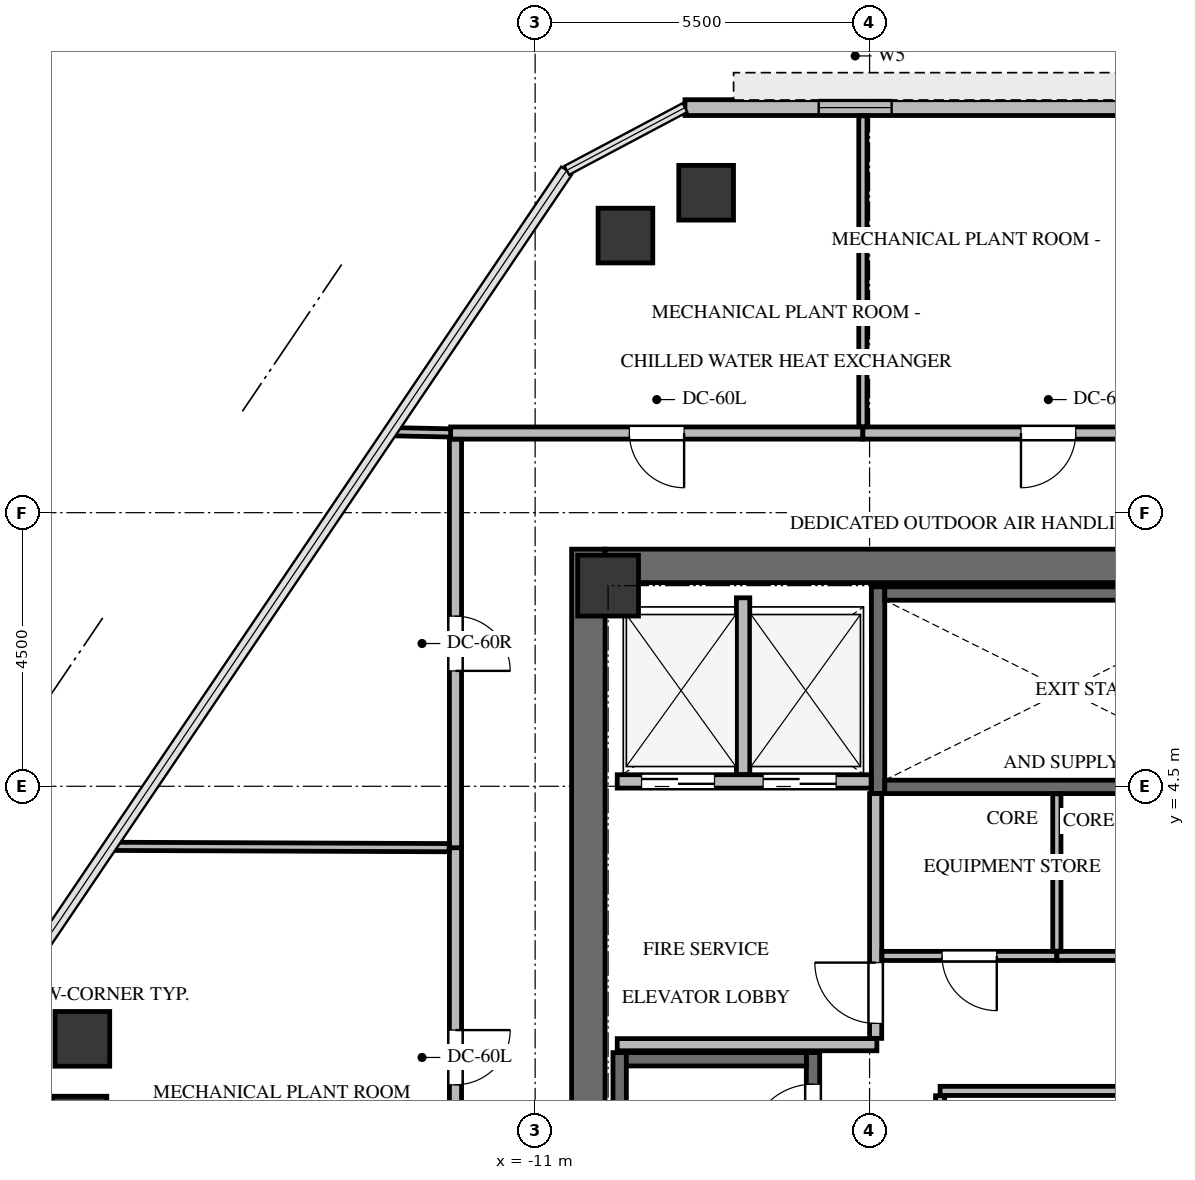
"""IFC4 building model, lengths in metres.
Left out: names, types, materials, properties, quantities, classifications, styles, units other than length and angle.
Written with IfcOpenShell. Run it as: python <this file> out.ifc"""

import sys

from ifc_helpers import new_model, si_unit, direction, frame, frame_2d, origin, origin_2d, place, context, subcontext, project, spatial, rectangle, extrude, source, transform, mapped, element, fill, save


model = new_model("IFC4")
c1 = context("Model", 3, precision=1e-05, world=origin(), true_north=direction((0.0, 1.0)))
c2 = subcontext(c1, "Body", "Model", "MODEL_VIEW")
j1 = project(units=[si_unit("LENGTHUNIT", "METRE"), si_unit("PLANEANGLEUNIT", "RADIAN")], contexts=[c1])
p1 = place(None, origin())
s1 = spatial("IfcSite", under=j1, at=p1, CompositionType="ELEMENT")
p2 = place(p1, origin())
s2 = spatial("IfcBuilding", under=s1, at=p2, CompositionType="ELEMENT")
p3 = place(p2, frame((0.0, 0.0, 268.3)))
s3 = spatial("IfcBuildingStorey", under=s2, at=p3, CompositionType="ELEMENT", Elevation=268.3)
p4 = place(p3, frame((-10.125, -8.4, 0.0), z_axis=(0.0, 0.0, 1.0), x_axis=(0.0, 1.0, 0.0)))
e1 = element("IfcWall", 1, at=p4, inside=s3, PredefinedType="SHEAR", context=c2, shape_type="SweptSolid", body=[
    extrude(rectangle(XDim=16.8, YDim=0.55, at=frame_2d((8.4, 0.0))), origin(), (0.0, 0.0, 1.0), 4.2),
])
p5 = place(p3, frame((-9.85, 8.125, 0.0), z_axis=(0.0, 0.0, 1.0), x_axis=(1.0, 0.0, 0.0)))
e2 = element("IfcWall", 2, at=p5, inside=s3, PredefinedType="SHEAR", context=c2, shape_type="SweptSolid", body=[
    extrude(rectangle(XDim=19.7, YDim=0.55, at=frame_2d((9.85, 0.0))), origin(), (0.0, 0.0, 1.0), 4.2),
])
p6 = place(p3, frame((-6.43, -7.77, -0.3), z_axis=(0.0, 0.0, 1.0), x_axis=(0.0, 1.0, 0.0)))
e3 = element("IfcWall", 3, at=p6, inside=s3, PredefinedType="SHEAR", context=c2, shape_type="SweptSolid", body=[
    extrude(rectangle(XDim=7.89, YDim=0.22, at=frame_2d((3.945, 0.0))), origin(), (0.0, 0.0, 1.0), 4.05),
])
p7 = place(p6, frame((6.32, 0.0, 0.0)))
e4 = element("IfcOpeningElement", 4, at=p7, cuts=e3, PredefinedType="OPENING", context=c2, shape_type="SweptSolid", body=[
    extrude(rectangle(XDim=1.05, YDim=2.15, at=frame_2d((0.525, 1.075))), frame((0.0, 0.12, 0.0), z_axis=(0.0, -1.0, 0.0), x_axis=(1.0, 0.0, 0.0)), (0.0, 0.0, 1.0), 0.24),
])
p8 = place(p3, frame((-9.61, 0.12, -0.3), z_axis=(0.0, 0.0, 1.0), x_axis=(0.0, -1.0, 0.0)))
e5 = element("IfcWall", 5, at=p8, inside=s3, PredefinedType="SHEAR", context=c2, shape_type="SweptSolid", body=[
    extrude(rectangle(XDim=7.89, YDim=0.22, at=frame_2d((3.945, 0.0))), origin(), (0.0, 0.0, 1.0), 4.05),
])
p9 = place(p3, frame((-6.54, 0.01, -0.3), z_axis=(0.0, 0.0, 1.0), x_axis=(-1.0, 0.0, 0.0)))
e6 = element("IfcWall", 6, at=p9, inside=s3, PredefinedType="SHEAR", context=c2, shape_type="SweptSolid", body=[
    extrude(rectangle(XDim=2.96, YDim=0.22, at=frame_2d((1.48, 0.0))), origin(), (0.0, 0.0, 1.0), 4.05),
])
p10 = place(p3, frame((-5.36, 7.78, -0.3), z_axis=(0.0, 0.0, 1.0), x_axis=(0.0, -1.0, 0.0)))
e7 = element("IfcWall", 7, at=p10, inside=s3, PredefinedType="SHEAR", context=c2, shape_type="SweptSolid", body=[
    extrude(rectangle(XDim=3.4, YDim=0.22, at=frame_2d((1.7, 0.0))), origin(), (0.0, 0.0, 1.0), 4.05),
])
p11 = place(p3, frame((-5.25, 4.49, -0.3), z_axis=(0.0, 0.0, 1.0), x_axis=(1.0, 0.0, 0.0)))
e8 = element("IfcWall", 8, at=p11, inside=s3, PredefinedType="SHEAR", context=c2, shape_type="SweptSolid", body=[
    extrude(rectangle(XDim=7.35, YDim=0.22, at=frame_2d((3.675, 0.0))), origin(), (0.0, 0.0, 1.0), 4.05),
])
p12 = place(p11, frame((5.85, 0.0, 0.0)))
e9 = element("IfcOpeningElement", 9, at=p12, cuts=e8, PredefinedType="OPENING", context=c2, shape_type="SweptSolid", body=[
    extrude(rectangle(XDim=1.05, YDim=2.15, at=frame_2d((0.525, 1.075))), frame((0.0, 0.12, 0.0), z_axis=(0.0, -1.0, 0.0), x_axis=(1.0, 0.0, 0.0)), (0.0, 0.0, 1.0), 0.24),
])
p13 = place(p3, frame((2.1, 7.67, -0.3), z_axis=(0.0, 0.0, 1.0), x_axis=(-1.0, 0.0, 0.0)))
e10 = element("IfcWall", 10, at=p13, inside=s3, PredefinedType="SHEAR", context=c2, shape_type="SweptSolid", body=[
    extrude(rectangle(XDim=7.35, YDim=0.22, at=frame_2d((3.675, 0.0))), origin(), (0.0, 0.0, 1.0), 4.05),
])
m1 = source(origin(), c2, "Body", "SweptSolid", [
    extrude(rectangle(XDim=1.0, YDim=1.0, at=origin_2d()), origin(), (0.0, 0.0, 1.0), 4.05),
])
p14 = place(p3, frame((-9.8, 7.8, -0.3), z_axis=(0.0, 0.0, 1.0), x_axis=(1.0, 0.0, 0.0)))
e11 = element("IfcColumn", 11, at=p14, inside=s3, PredefinedType="COLUMN", context=c2, shape_type="MappedRepresentation", body=[
    mapped(m1, transform((0.0, 0.0, 0.0), x_axis=(1.0, 0.0, 0.0), y_axis=(0.0, 1.0, 0.0), z_axis=(0.0, 0.0, 1.0), scale=1.0)),
])
m2 = source(origin(), c2, "Body", "SweptSolid", [
    extrude(rectangle(XDim=0.9, YDim=0.9, at=origin_2d()), origin(), (0.0, 0.0, 1.0), 4.05),
])
for number, where, z_axis, x_axis in (
    (12, (-18.494, -1.048, -0.3), (0.0, 0.0, 1.0), (1.0, 0.0, 0.0)),
    (13, (-18.446, 0.346, -0.3), (0.0, 0.0, 1.0), (1.0, 0.0, 0.0)),
    (14, (-9.515, 13.557, -0.3), (0.0, 0.0, 1.0), (1.0, 0.0, 0.0)),
    (15, (-8.188, 14.262, -0.3), (0.0, 0.0, 1.0), (1.0, 0.0, 0.0)),
):
    element("IfcColumn", number, at=place(p3, frame(where, z_axis=z_axis, x_axis=x_axis)), inside=s3, PredefinedType="COLUMN", context=c2, shape_type="MappedRepresentation", body=[
        mapped(m2, transform((0.0, 0.0, 0.0), x_axis=(1.0, 0.0, 0.0), y_axis=(0.0, 1.0, 0.0), z_axis=(0.0, 0.0, 1.0), scale=1.0)),
    ])
p15 = place(p3, frame((-8.536, 15.662, 0.0), z_axis=(0.0, 0.0, 1.0), x_axis=(1.0, 0.0, 0.0)))
e16 = element("IfcWall", 16, at=p15, inside=s3, PredefinedType="SOLIDWALL", context=c2, shape_type="SweptSolid", body=[
    extrude(rectangle(XDim=16.49, YDim=0.26, at=frame_2d((8.245, 0.0))), origin(), (0.0, 0.0, 1.0), 3.75),
])
p16 = place(p15, frame((2.2, 0.0, 0.9)))
e17 = element("IfcOpeningElement", 17, at=p16, cuts=e16, PredefinedType="OPENING", context=c2, shape_type="SweptSolid", body=[
    extrude(rectangle(XDim=1.2, YDim=1.5, at=frame_2d((0.6, 0.75))), frame((0.0, 0.14, 0.0), z_axis=(0.0, -1.0, 0.0), x_axis=(1.0, 0.0, 0.0)), (0.0, 0.0, 1.0), 0.28),
])
p17 = place(p15, frame((13.09, 0.0, 0.9)))
e18 = element("IfcOpeningElement", 18, at=p17, cuts=e16, PredefinedType="OPENING", context=c2, shape_type="SweptSolid", body=[
    extrude(rectangle(XDim=1.2, YDim=1.5, at=frame_2d((0.6, 0.75))), frame((0.0, 0.14, 0.0), z_axis=(0.0, -1.0, 0.0), x_axis=(1.0, 0.0, 0.0)), (0.0, 0.0, 1.0), 0.28),
])
p18 = place(p3, frame((-9.65, 4.58, 0.0), z_axis=(0.0, 0.0, 1.0), x_axis=(1.0, 0.0, 0.0)))
e19 = element("IfcWall", 19, at=p18, inside=s3, PredefinedType="SOLIDWALL", context=c2, shape_type="SweptSolid", body=[
    extrude(rectangle(XDim=4.175, YDim=0.22, at=frame_2d((2.087, 0.0))), origin(), (0.0, 0.0, 1.0), 3.735),
])
p19 = place(p18, frame((0.4, 0.0, 0.0)))
e20 = element("IfcOpeningElement", 20, at=p19, cuts=e19, PredefinedType="OPENING", context=c2, shape_type="SweptSolid", body=[
    extrude(rectangle(XDim=1.2, YDim=2.15, at=frame_2d((0.6, 1.075))), frame((0.0, 0.12, 0.0), z_axis=(0.0, -1.0, 0.0), x_axis=(1.0, 0.0, 0.0)), (0.0, 0.0, 1.0), 0.24),
])
p20 = place(p18, frame((2.4, 0.0, 0.0)))
e21 = element("IfcOpeningElement", 21, at=p20, cuts=e19, PredefinedType="OPENING", context=c2, shape_type="SweptSolid", body=[
    extrude(rectangle(XDim=1.2, YDim=2.15, at=frame_2d((0.6, 1.075))), frame((0.0, 0.12, 0.0), z_axis=(0.0, -1.0, 0.0), x_axis=(1.0, 0.0, 0.0)), (0.0, 0.0, 1.0), 0.24),
])
p21 = place(p3, frame((-7.58, 4.694, 0.0), z_axis=(0.0, 0.0, 1.0), x_axis=(0.0, 1.0, 0.0)))
e22 = element("IfcWall", 22, at=p21, inside=s3, PredefinedType="SOLIDWALL", context=c2, shape_type="SweptSolid", body=[
    extrude(rectangle(XDim=2.906, YDim=0.22, at=frame_2d((1.453, 0.0))), origin(), (0.0, 0.0, 1.0), 3.735),
])
p22 = place(p3, frame((-9.65, 0.25, 0.0), z_axis=(0.0, 0.0, 1.0), x_axis=(1.0, 0.0, 0.0)))
e23 = element("IfcWall", 23, at=p22, inside=s3, PredefinedType="SOLIDWALL", context=c2, shape_type="SweptSolid", body=[
    extrude(rectangle(XDim=4.27, YDim=0.2, at=frame_2d((2.135, 0.0))), origin(), (0.0, 0.0, 1.0), 3.735),
])
p23 = place(p3, frame((-5.4, 0.354, 0.0), z_axis=(0.0, 0.0, 1.0), x_axis=(0.0, 1.0, 0.0)))
e24 = element("IfcWall", 24, at=p23, inside=s3, PredefinedType="SOLIDWALL", context=c2, shape_type="SweptSolid", body=[
    extrude(rectangle(XDim=4.026, YDim=0.2, at=frame_2d((2.013, 0.0))), origin(), (0.0, 0.0, 1.0), 3.735),
])
p24 = place(p23, frame((0.246, 0.0, 0.0)))
e25 = element("IfcOpeningElement", 25, at=p24, cuts=e24, PredefinedType="OPENING", context=c2, shape_type="SweptSolid", body=[
    extrude(rectangle(XDim=1.0, YDim=2.15, at=frame_2d((0.5, 1.075))), frame((0.0, 0.11, 0.0), z_axis=(0.0, -1.0, 0.0), x_axis=(1.0, 0.0, 0.0)), (0.0, 0.0, 1.0), 0.22),
])
p25 = place(p3, frame((-4.34, -0.51, 0.0), z_axis=(0.0, 0.0, 1.0), x_axis=(1.0, 0.0, 0.0)))
e26 = element("IfcWall", 26, at=p25, inside=s3, PredefinedType="PARTITIONING", context=c2, shape_type="SweptSolid", body=[
    extrude(rectangle(XDim=5.53, YDim=0.15, at=frame_2d((2.765, 0.0))), origin(), (0.0, 0.0, 1.0), 3.735),
])
p26 = place(p3, frame((-4.34, -2.961, 0.0), z_axis=(0.0, 0.0, 1.0), x_axis=(0.0, 1.0, 0.0)))
e27 = element("IfcWall", 27, at=p26, inside=s3, PredefinedType="PARTITIONING", context=c2, shape_type="SweptSolid", body=[
    extrude(rectangle(XDim=2.372, YDim=0.15, at=frame_2d((1.186, 0.0))), origin(), (0.0, 0.0, 1.0), 3.735),
])
p27 = place(p3, frame((-2.42, 1.71, 0.0), z_axis=(0.0, 0.0, 1.0), x_axis=(-1.0, 0.0, 0.0)))
e28 = element("IfcWall", 28, at=p27, inside=s3, PredefinedType="PARTITIONING", context=c2, shape_type="SweptSolid", body=[
    extrude(rectangle(XDim=2.876, YDim=0.15, at=frame_2d((1.438, 0.0))), origin(), (0.0, 0.0, 1.0), 3.735),
])
p28 = place(p27, frame((0.988, 0.0, 0.0)))
e29 = element("IfcOpeningElement", 29, at=p28, cuts=e28, PredefinedType="OPENING", context=c2, shape_type="SweptSolid", body=[
    extrude(rectangle(XDim=0.9, YDim=2.05, at=frame_2d((0.45, 1.025))), frame((0.0, 0.085, 0.0), z_axis=(0.0, -1.0, 0.0), x_axis=(1.0, 0.0, 0.0)), (0.0, 0.0, 1.0), 0.17),
])
p29 = place(p3, frame((0.52, 1.71, 0.0), z_axis=(0.0, 0.0, 1.0), x_axis=(-1.0, 0.0, 0.0)))
e30 = element("IfcWall", 30, at=p29, inside=s3, PredefinedType="PARTITIONING", context=c2, shape_type="SweptSolid", body=[
    extrude(rectangle(XDim=2.94, YDim=0.15, at=frame_2d((1.47, 0.0))), origin(), (0.0, 0.0, 1.0), 3.735),
])
p30 = place(p29, frame((1.02, 0.0, 0.0)))
e31 = element("IfcOpeningElement", 31, at=p30, cuts=e30, PredefinedType="OPENING", context=c2, shape_type="SweptSolid", body=[
    extrude(rectangle(XDim=0.9, YDim=2.05, at=frame_2d((0.45, 1.025))), frame((0.0, 0.085, 0.0), z_axis=(0.0, -1.0, 0.0), x_axis=(1.0, 0.0, 0.0)), (0.0, 0.0, 1.0), 0.17),
])
p31 = place(p3, frame((-5.61, 10.31, 0.0), z_axis=(0.0, 0.0, 1.0), x_axis=(-1.0, 0.0, 0.0)))
e32 = element("IfcWall", 32, at=p31, inside=s3, PredefinedType="SOLIDWALL", context=c2, shape_type="SweptSolid", body=[
    extrude(rectangle(XDim=6.78, YDim=0.2, at=frame_2d((3.39, 0.0))), origin(), (0.0, 0.0, 1.0), 2.32),
])
p32 = place(p31, frame((2.94, 0.0, 0.0)))
e33 = element("IfcOpeningElement", 33, at=p32, cuts=e32, PredefinedType="OPENING", context=c2, shape_type="SweptSolid", body=[
    extrude(rectangle(XDim=0.9, YDim=2.05, at=frame_2d((0.45, 1.025))), frame((0.0, 0.11, 0.0), z_axis=(0.0, -1.0, 0.0), x_axis=(1.0, 0.0, 0.0)), (0.0, 0.0, 1.0), 0.22),
])
p33 = place(p3, frame((0.49, 10.31, 0.0), z_axis=(0.0, 0.0, 1.0), x_axis=(-1.0, 0.0, 0.0)))
e34 = element("IfcWall", 34, at=p33, inside=s3, PredefinedType="SOLIDWALL", context=c2, shape_type="SweptSolid", body=[
    extrude(rectangle(XDim=6.1, YDim=0.2, at=frame_2d((3.05, 0.0))), origin(), (0.0, 0.0, 1.0), 2.32),
])
p34 = place(p33, frame((2.6, 0.0, 0.0)))
e35 = element("IfcOpeningElement", 35, at=p34, cuts=e34, PredefinedType="OPENING", context=c2, shape_type="SweptSolid", body=[
    extrude(rectangle(XDim=0.9, YDim=2.05, at=frame_2d((0.45, 1.025))), frame((0.0, 0.11, 0.0), z_axis=(0.0, -1.0, 0.0), x_axis=(1.0, 0.0, 0.0)), (0.0, 0.0, 1.0), 0.22),
])
p35 = place(p3, frame((-12.31, 3.49, 0.0), z_axis=(0.0, 0.0, 1.0), x_axis=(0.0, -1.0, 0.0)))
e36 = element("IfcWall", 36, at=p35, inside=s3, PredefinedType="SOLIDWALL", context=c2, shape_type="SweptSolid", body=[
    extrude(rectangle(XDim=6.9, YDim=0.2, at=frame_2d((3.45, 0.0))), origin(), (0.0, 0.0, 1.0), 3.093),
])
p36 = place(p35, frame((3.0, 0.0, 0.0)))
e37 = element("IfcOpeningElement", 37, at=p36, cuts=e36, PredefinedType="OPENING", context=c2, shape_type="SweptSolid", body=[
    extrude(rectangle(XDim=0.9, YDim=2.05, at=frame_2d((0.45, 1.025))), frame((0.0, 0.11, 0.0), z_axis=(0.0, -1.0, 0.0), x_axis=(1.0, 0.0, 0.0)), (0.0, 0.0, 1.0), 0.22),
])
p37 = place(p3, frame((-12.31, 10.206, 0.0), z_axis=(0.0, 0.0, 1.0), x_axis=(0.0, -1.0, 0.0)))
e38 = element("IfcWall", 38, at=p37, inside=s3, PredefinedType="SOLIDWALL", context=c2, shape_type="SweptSolid", body=[
    extrude(rectangle(XDim=6.716, YDim=0.2, at=frame_2d((3.358, 0.0))), origin(), (0.0, 0.0, 1.0), 2.32),
])
p38 = place(p37, frame((2.908, 0.0, 0.0)))
e39 = element("IfcOpeningElement", 39, at=p38, cuts=e38, PredefinedType="OPENING", context=c2, shape_type="SweptSolid", body=[
    extrude(rectangle(XDim=0.9, YDim=2.05, at=frame_2d((0.45, 1.025))), frame((0.0, 0.11, 0.0), z_axis=(0.0, -1.0, 0.0), x_axis=(1.0, 0.0, 0.0)), (0.0, 0.0, 1.0), 0.22),
])
p39 = place(p3, frame((-2.42, 4.375, 0.0), z_axis=(0.0, 0.0, 1.0), x_axis=(0.0, -1.0, 0.0)))
e40 = element("IfcWall", 40, at=p39, inside=s3, PredefinedType="PARTITIONING", context=c2, shape_type="SweptSolid", body=[
    extrude(rectangle(XDim=2.586, YDim=0.135, at=frame_2d((1.293, 0.0))), origin(), (0.0, 0.0, 1.0), 3.735),
])
p40 = place(p3, frame((-5.61, 15.527, 0.0), z_axis=(0.0, 0.0, 1.0), x_axis=(0.0, -1.0, 0.0)))
e41 = element("IfcWall", 41, at=p40, inside=s3, PredefinedType="PARTITIONING", context=c2, shape_type="SweptSolid", body=[
    extrude(rectangle(XDim=5.113, YDim=0.135, at=frame_2d((2.557, 0.0))), origin(), (0.0, 0.0, 1.0), 2.32),
])
p41 = place(p3, frame((-12.39, 10.312, 0.0), z_axis=(0.0, 0.0, 1.0), x_axis=(-0.999782630862, 0.020849245246, 0.0)))
e42 = element("IfcWall", 42, at=p41, inside=s3, PredefinedType="PARTITIONING", context=c2, shape_type="SweptSolid", body=[
    extrude(rectangle(XDim=0.995, YDim=0.135, at=frame_2d((0.498, 0.0))), origin(), (0.0, 0.0, 1.0), 2.32),
])
p42 = place(p3, frame((-17.996, 3.512, 0.0), z_axis=(0.0, 0.0, 1.0), x_axis=(0.99999225143, -0.003936632956, 0.0)))
e43 = element("IfcWall", 43, at=p42, inside=s3, PredefinedType="PARTITIONING", context=c2, shape_type="SweptSolid", body=[
    extrude(rectangle(XDim=5.582, YDim=0.135, at=frame_2d((2.791, 0.0))), origin(), (0.0, 0.0, 1.0), 2.32),
])
m3 = source(origin(), c2, "Body", "SweptSolid", [
    extrude(rectangle(XDim=1.2, YDim=1.5, at=frame_2d((0.6, 0.75))), frame((0.0, 0.03, 0.0), z_axis=(0.0, -1.0, 0.0), x_axis=(1.0, 0.0, 0.0)), (0.0, 0.0, 1.0), 0.06),
])
p43 = place(p16, origin())
e44 = element("IfcWindow", 44, at=p43, inside=s3, PartitioningType="SINGLE_PANEL", PredefinedType="WINDOW", context=c2, shape_type="MappedRepresentation", body=[
    mapped(m3, transform((0.0, 0.0, 0.0), x_axis=(1.0, 0.0, 0.0), y_axis=(0.0, 1.0, 0.0), z_axis=(0.0, 0.0, 1.0), scale=1.0)),
])
fill(e17, e44)
m4 = source(origin(), c2, "Body", "SweptSolid", [
    extrude(rectangle(XDim=1.05, YDim=2.15, at=frame_2d((0.525, 1.075))), frame((0.0, 0.025, 0.0), z_axis=(0.0, -1.0, 0.0), x_axis=(1.0, 0.0, 0.0)), (0.0, 0.0, 1.0), 0.05),
])
p44 = place(p7, origin())
e45 = element("IfcDoor", 45, at=p44, inside=s3, OperationType="SINGLE_SWING_LEFT", PredefinedType="DOOR", context=c2, shape_type="MappedRepresentation", body=[
    mapped(m4, transform((0.0, 0.0, 0.0), x_axis=(1.0, 0.0, 0.0), y_axis=(0.0, 1.0, 0.0), z_axis=(0.0, 0.0, 1.0), scale=1.0)),
])
fill(e4, e45)
m5 = source(origin(), c2, "Body", "SweptSolid", [
    extrude(rectangle(XDim=1.2, YDim=2.15, at=frame_2d((0.6, 1.075))), frame((0.0, 0.025, 0.0), z_axis=(0.0, -1.0, 0.0), x_axis=(1.0, 0.0, 0.0)), (0.0, 0.0, 1.0), 0.05),
])
p45 = place(p19, origin())
e46 = element("IfcDoor", 46, at=p45, inside=s3, OperationType="DOUBLE_DOOR_SLIDING", PredefinedType="DOOR", context=c2, shape_type="MappedRepresentation", body=[
    mapped(m5, transform((0.0, 0.0, 0.0), x_axis=(1.0, 0.0, 0.0), y_axis=(0.0, 1.0, 0.0), z_axis=(0.0, 0.0, 1.0), scale=1.0)),
])
fill(e20, e46)
p46 = place(p20, origin())
e47 = element("IfcDoor", 47, at=p46, inside=s3, OperationType="DOUBLE_DOOR_SLIDING", PredefinedType="DOOR", context=c2, shape_type="MappedRepresentation", body=[
    mapped(m5, transform((0.0, 0.0, 0.0), x_axis=(1.0, 0.0, 0.0), y_axis=(0.0, 1.0, 0.0), z_axis=(0.0, 0.0, 1.0), scale=1.0)),
])
fill(e21, e47)
m6 = source(origin(), c2, "Body", "SweptSolid", [
    extrude(rectangle(XDim=1.0, YDim=2.15, at=frame_2d((0.5, 1.075))), frame((0.0, 0.025, 0.0), z_axis=(0.0, -1.0, 0.0), x_axis=(1.0, 0.0, 0.0)), (0.0, 0.0, 1.0), 0.05),
])
p47 = place(p24, origin())
e48 = element("IfcDoor", 48, at=p47, inside=s3, OperationType="SINGLE_SWING_RIGHT", PredefinedType="DOOR", context=c2, shape_type="MappedRepresentation", body=[
    mapped(m6, transform((0.0, 0.0, 0.0), x_axis=(1.0, 0.0, 0.0), y_axis=(0.0, 1.0, 0.0), z_axis=(0.0, 0.0, 1.0), scale=1.0)),
])
fill(e25, e48)
m7 = source(origin(), c2, "Body", "SweptSolid", [
    extrude(rectangle(XDim=0.9, YDim=2.05, at=frame_2d((0.45, 1.025))), frame((0.0, 0.025, 0.0), z_axis=(0.0, -1.0, 0.0), x_axis=(1.0, 0.0, 0.0)), (0.0, 0.0, 1.0), 0.05),
])
p48 = place(p28, origin())
e49 = element("IfcDoor", 49, at=p48, inside=s3, OperationType="SINGLE_SWING_LEFT", PredefinedType="DOOR", context=c2, shape_type="MappedRepresentation", body=[
    mapped(m7, transform((0.0, 0.0, 0.0), x_axis=(1.0, 0.0, 0.0), y_axis=(0.0, 1.0, 0.0), z_axis=(0.0, 0.0, 1.0), scale=1.0)),
])
fill(e29, e49)
p49 = place(p32, origin())
e50 = element("IfcDoor", 50, at=p49, inside=s3, OperationType="SINGLE_SWING_LEFT", PredefinedType="DOOR", context=c2, shape_type="MappedRepresentation", body=[
    mapped(m7, transform((0.0, 0.0, 0.0), x_axis=(1.0, 0.0, 0.0), y_axis=(0.0, 1.0, 0.0), z_axis=(0.0, 0.0, 1.0), scale=1.0)),
])
fill(e33, e50)
m8 = source(origin(), c2, "Body", "SweptSolid", [
    extrude(rectangle(XDim=0.9, YDim=2.05, at=frame_2d((0.45, 1.025))), frame((0.0, 0.025, 0.0), z_axis=(0.0, -1.0, 0.0), x_axis=(1.0, 0.0, 0.0)), (0.0, 0.0, 1.0), 0.05),
])
p50 = place(p34, origin())
e51 = element("IfcDoor", 51, at=p50, inside=s3, OperationType="SINGLE_SWING_RIGHT", PredefinedType="DOOR", context=c2, shape_type="MappedRepresentation", body=[
    mapped(m8, transform((0.0, 0.0, 0.0), x_axis=(1.0, 0.0, 0.0), y_axis=(0.0, 1.0, 0.0), z_axis=(0.0, 0.0, 1.0), scale=1.0)),
])
fill(e35, e51)
p51 = place(p36, origin())
e52 = element("IfcDoor", 52, at=p51, inside=s3, OperationType="SINGLE_SWING_LEFT", PredefinedType="DOOR", context=c2, shape_type="MappedRepresentation", body=[
    mapped(m7, transform((0.0, 0.0, 0.0), x_axis=(1.0, 0.0, 0.0), y_axis=(0.0, 1.0, 0.0), z_axis=(0.0, 0.0, 1.0), scale=1.0)),
])
fill(e37, e52)
p52 = place(p38, origin())
e53 = element("IfcDoor", 53, at=p52, inside=s3, OperationType="SINGLE_SWING_RIGHT", PredefinedType="DOOR", context=c2, shape_type="MappedRepresentation", body=[
    mapped(m8, transform((0.0, 0.0, 0.0), x_axis=(1.0, 0.0, 0.0), y_axis=(0.0, 1.0, 0.0), z_axis=(0.0, 0.0, 1.0), scale=1.0)),
])
fill(e39, e53)
save(model, sys.argv[1])
